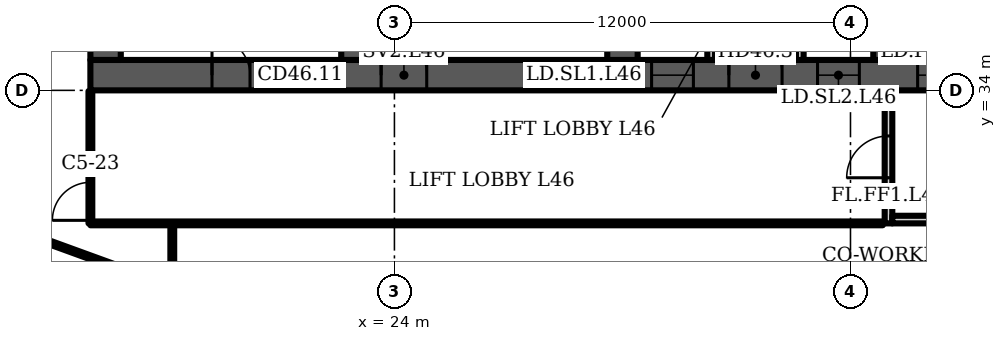
"""IFC4 building model, lengths in metres.
Left out: names, types, materials, properties, quantities, classifications, styles, units other than length and angle.
Written with IfcOpenShell. Run it as: python <this file> out.ifc"""

import sys

from ifc_helpers import new_model, si_unit, direction, frame, frame_2d, origin, place, context, subcontext, project, spatial, polyline, rectangle, outline, extrude, element, fill, save


model = new_model("IFC4")
c1 = context("Model", 3, precision=1e-05, world=origin(), true_north=direction((0.0, 1.0)))
c2 = subcontext(c1, "Body", "Model", "MODEL_VIEW")
j1 = project(units=[si_unit("LENGTHUNIT", "METRE"), si_unit("PLANEANGLEUNIT", "RADIAN")], contexts=[c1])
p1 = place(None, origin())
s1 = spatial("IfcSite", under=j1, at=p1, CompositionType="ELEMENT")
p2 = place(p1, origin())
s2 = spatial("IfcBuilding", under=s1, at=p2, CompositionType="ELEMENT")
p3 = place(p2, frame((0.0, 0.0, 187.9)))
s3 = spatial("IfcBuildingStorey", under=s2, at=p3, CompositionType="ELEMENT", Elevation=187.9)
p4 = place(p3, frame((16.0, 34.4, 0.0), z_axis=(0.0, 0.0, 1.0), x_axis=(1.0, 0.0, 0.0)))
e1 = element("IfcWall", 1, at=p4, inside=s3, PredefinedType="SHEAR", context=c2, shape_type="SweptSolid", body=[
    extrude(rectangle(XDim=42.0, YDim=0.8, at=frame_2d((21.0, 0.0))), origin(), (0.0, 0.0, 1.0), 3.6),
])
p5 = place(p4, frame((3.2, 0.0, 0.0)))
e2 = element("IfcOpeningElement", 2, at=p5, cuts=e1, PredefinedType="OPENING", context=c2, shape_type="SweptSolid", body=[
    extrude(rectangle(XDim=1.0, YDim=2.1, at=frame_2d((0.5, 1.05))), frame((0.0, 0.41, 0.0), z_axis=(0.0, -1.0, 0.0), x_axis=(1.0, 0.0, 0.0)), (0.0, 0.0, 1.0), 0.82),
])
p6 = place(p4, frame((7.65, 0.0, 0.0)))
e3 = element("IfcOpeningElement", 3, at=p6, cuts=e1, PredefinedType="OPENING", context=c2, shape_type="SweptSolid", body=[
    extrude(rectangle(XDim=1.2, YDim=2.1, at=frame_2d((0.6, 1.05))), frame((0.0, 0.41, 0.0), z_axis=(0.0, -1.0, 0.0), x_axis=(1.0, 0.0, 0.0)), (0.0, 0.0, 1.0), 0.82),
])
p7 = place(p4, frame((14.767, 0.0, 0.0)))
e4 = element("IfcOpeningElement", 4, at=p7, cuts=e1, PredefinedType="OPENING", context=c2, shape_type="SweptSolid", body=[
    extrude(rectangle(XDim=1.1, YDim=2.1, at=frame_2d((0.55, 1.05))), frame((0.0, 0.41, 0.0), z_axis=(0.0, -1.0, 0.0), x_axis=(1.0, 0.0, 0.0)), (0.0, 0.0, 1.0), 0.82),
])
p8 = place(p4, frame((19.133, 0.0, 0.0)))
e5 = element("IfcOpeningElement", 5, at=p8, cuts=e1, PredefinedType="OPENING", context=c2, shape_type="SweptSolid", body=[
    extrude(rectangle(XDim=1.1, YDim=2.1, at=frame_2d((0.55, 1.05))), frame((0.0, 0.41, 0.0), z_axis=(0.0, -1.0, 0.0), x_axis=(1.0, 0.0, 0.0)), (0.0, 0.0, 1.0), 0.82),
])
p9 = place(p4, frame((16.8, 0.0, 0.0)))
e6 = element("IfcOpeningElement", 6, at=p9, cuts=e1, PredefinedType="OPENING", context=c2, shape_type="SweptSolid", body=[
    extrude(rectangle(XDim=1.4, YDim=2.1, at=frame_2d((0.7, 1.05))), frame((0.0, 0.41, 0.0), z_axis=(0.0, -1.0, 0.0), x_axis=(1.0, 0.0, 0.0)), (0.0, 0.0, 1.0), 0.82),
])
p10 = place(p4, frame((21.767, 0.0, 0.0)))
e7 = element("IfcOpeningElement", 7, at=p10, cuts=e1, PredefinedType="OPENING", context=c2, shape_type="SweptSolid", body=[
    extrude(rectangle(XDim=1.1, YDim=2.1, at=frame_2d((0.55, 1.05))), frame((0.0, 0.41, 0.0), z_axis=(0.0, -1.0, 0.0), x_axis=(1.0, 0.0, 0.0)), (0.0, 0.0, 1.0), 0.82),
])
p11 = place(p4, frame((23.95, 0.0, 0.0)))
e8 = element("IfcOpeningElement", 8, at=p11, cuts=e1, PredefinedType="OPENING", context=c2, shape_type="SweptSolid", body=[
    extrude(rectangle(XDim=1.1, YDim=2.1, at=frame_2d((0.55, 1.05))), frame((0.0, 0.41, 0.0), z_axis=(0.0, -1.0, 0.0), x_axis=(1.0, 0.0, 0.0)), (0.0, 0.0, 1.0), 0.82),
])
p12 = place(p4, frame((26.133, 0.0, 0.0)))
e9 = element("IfcOpeningElement", 9, at=p12, cuts=e1, PredefinedType="OPENING", context=c2, shape_type="SweptSolid", body=[
    extrude(rectangle(XDim=1.1, YDim=2.1, at=frame_2d((0.55, 1.05))), frame((0.0, 0.41, 0.0), z_axis=(0.0, -1.0, 0.0), x_axis=(1.0, 0.0, 0.0)), (0.0, 0.0, 1.0), 0.82),
])
p13 = place(p4, frame((33.15, 0.0, 0.0)))
e10 = element("IfcOpeningElement", 10, at=p13, cuts=e1, PredefinedType="OPENING", context=c2, shape_type="SweptSolid", body=[
    extrude(rectangle(XDim=1.2, YDim=2.1, at=frame_2d((0.6, 1.05))), frame((0.0, 0.41, 0.0), z_axis=(0.0, -1.0, 0.0), x_axis=(1.0, 0.0, 0.0)), (0.0, 0.0, 1.0), 0.82),
])
p14 = place(p4, frame((35.817, 0.0, 0.0)))
e11 = element("IfcOpeningElement", 11, at=p14, cuts=e1, PredefinedType="OPENING", context=c2, shape_type="SweptSolid", body=[
    extrude(rectangle(XDim=1.0, YDim=2.1, at=frame_2d((0.5, 1.05))), frame((0.0, 0.41, 0.0), z_axis=(0.0, -1.0, 0.0), x_axis=(1.0, 0.0, 0.0)), (0.0, 0.0, 1.0), 0.82),
])
p15 = place(p4, frame((39.95, 0.0, 0.0)))
e12 = element("IfcOpeningElement", 12, at=p15, cuts=e1, PredefinedType="OPENING", context=c2, shape_type="SweptSolid", body=[
    extrude(rectangle(XDim=1.0, YDim=2.1, at=frame_2d((0.5, 1.05))), frame((0.0, 0.41, 0.0), z_axis=(0.0, -1.0, 0.0), x_axis=(1.0, 0.0, 0.0)), (0.0, 0.0, 1.0), 0.82),
])
p16 = place(p4, frame((37.767, 0.0, 0.0)))
e13 = element("IfcOpeningElement", 13, at=p16, cuts=e1, PredefinedType="OPENING", context=c2, shape_type="SweptSolid", body=[
    extrude(rectangle(XDim=1.4, YDim=2.1, at=frame_2d((0.7, 1.05))), frame((0.0, 0.41, 0.0), z_axis=(0.0, -1.0, 0.0), x_axis=(1.0, 0.0, 0.0)), (0.0, 0.0, 1.0), 0.82),
])
p17 = place(p3, frame((16.4, 34.8, 0.0), z_axis=(0.0, 0.0, 1.0), x_axis=(0.0, 1.0, 0.0)))
e14 = element("IfcWall", 14, at=p17, inside=s3, PredefinedType="SHEAR", context=c2, shape_type="SweptSolid", body=[
    extrude(rectangle(XDim=13.184, YDim=0.8, at=frame_2d((6.592, 0.0))), origin(), (0.0, 0.0, 1.0), 3.6),
])
p18 = place(p3, frame((23.0, 34.8, 0.0), z_axis=(0.0, 0.0, 1.0), x_axis=(0.0, 1.0, 0.0)))
e15 = element("IfcWall", 15, at=p18, inside=s3, PredefinedType="SHEAR", context=c2, shape_type="SweptSolid", body=[
    extrude(rectangle(XDim=13.762, YDim=0.8, at=frame_2d((6.881, 0.0))), origin(), (0.0, 0.0, 1.0), 3.6),
])
p19 = place(p18, frame((2.55, 0.0, 0.0)))
e16 = element("IfcOpeningElement", 16, at=p19, cuts=e15, PredefinedType="OPENING", context=c2, shape_type="SweptSolid", body=[
    extrude(rectangle(XDim=1.1, YDim=2.1, at=frame_2d((0.55, 1.05))), frame((0.0, 0.41, 0.0), z_axis=(0.0, -1.0, 0.0), x_axis=(1.0, 0.0, 0.0)), (0.0, 0.0, 1.0), 0.82),
])
p20 = place(p18, frame((10.0, 0.0, 0.0)))
e17 = element("IfcOpeningElement", 17, at=p20, cuts=e15, PredefinedType="OPENING", context=c2, shape_type="SweptSolid", body=[
    extrude(rectangle(XDim=1.0, YDim=2.1, at=frame_2d((0.5, 1.05))), frame((0.0, 0.41, 0.0), z_axis=(0.0, -1.0, 0.0), x_axis=(1.0, 0.0, 0.0)), (0.0, 0.0, 1.0), 0.82),
])
p21 = place(p3, frame((30.0, 34.8, 0.0), z_axis=(0.0, 0.0, 1.0), x_axis=(0.0, 1.0, 0.0)))
e18 = element("IfcWall", 18, at=p21, inside=s3, PredefinedType="SHEAR", context=c2, shape_type="SweptSolid", body=[
    extrude(rectangle(XDim=14.374, YDim=0.8, at=frame_2d((7.187, 0.0))), origin(), (0.0, 0.0, 1.0), 3.6),
])
p22 = place(p21, frame((3.6, 0.0, 0.0)))
e19 = element("IfcOpeningElement", 19, at=p22, cuts=e18, PredefinedType="OPENING", context=c2, shape_type="SweptSolid", body=[
    extrude(rectangle(XDim=1.1, YDim=2.1, at=frame_2d((0.55, 1.05))), frame((0.0, 0.41, 0.0), z_axis=(0.0, -1.0, 0.0), x_axis=(1.0, 0.0, 0.0)), (0.0, 0.0, 1.0), 0.82),
])
p23 = place(p3, frame((37.0, 34.8, 0.0), z_axis=(0.0, 0.0, 1.0), x_axis=(0.0, 1.0, 0.0)))
e20 = element("IfcWall", 20, at=p23, inside=s3, PredefinedType="SHEAR", context=c2, shape_type="SweptSolid", body=[
    extrude(rectangle(XDim=14.987, YDim=0.8, at=frame_2d((7.493, 0.0))), origin(), (0.0, 0.0, 1.0), 3.6),
])
p24 = place(p23, frame((11.312, 0.0, 0.0)))
e21 = element("IfcOpeningElement", 21, at=p24, cuts=e20, PredefinedType="OPENING", context=c2, shape_type="SweptSolid", body=[
    extrude(rectangle(XDim=1.0, YDim=2.1, at=frame_2d((0.5, 1.05))), frame((0.0, 0.41, 0.0), z_axis=(0.0, -1.0, 0.0), x_axis=(1.0, 0.0, 0.0)), (0.0, 0.0, 1.0), 0.82),
])
p25 = place(p23, frame((3.6, 0.0, 0.0)))
e22 = element("IfcOpeningElement", 22, at=p25, cuts=e20, PredefinedType="OPENING", context=c2, shape_type="SweptSolid", body=[
    extrude(rectangle(XDim=1.1, YDim=2.1, at=frame_2d((0.55, 1.05))), frame((0.0, 0.41, 0.0), z_axis=(0.0, -1.0, 0.0), x_axis=(1.0, 0.0, 0.0)), (0.0, 0.0, 1.0), 0.82),
])
p26 = place(p3, origin())
e23 = element("IfcWall", 23, at=p26, inside=s3, PredefinedType="PARTITIONING", context=c2, shape_type="SweptSolid", body=[
    extrude(outline(polyline([(32.233, 37.65), (30.4, 37.65), (30.4, 37.85), (32.233, 37.85), (32.433, 37.85), (32.433, 34.8), (32.233, 34.8), (32.233, 37.65)])), origin(), (0.0, 0.0, 1.0), 3.2),
])
p27 = place(p3, origin())
e24 = element("IfcWall", 24, at=p27, inside=s3, PredefinedType="PARTITIONING", context=c2, shape_type="SweptSolid", body=[
    extrude(outline(polyline([(34.567, 37.85), (34.767, 37.85), (36.6, 37.85), (36.6, 37.65), (34.767, 37.65), (34.767, 34.8), (34.567, 34.8), (34.567, 37.85)])), origin(), (0.0, 0.0, 1.0), 3.2),
])
p28 = place(p3, origin())
e25 = element("IfcWall", 25, at=p28, inside=s3, PredefinedType="PARTITIONING", context=c2, shape_type="SweptSolid", body=[
    extrude(outline(polyline([(41.567, 37.1), (39.433, 37.1), (39.433, 34.8), (39.233, 34.8), (39.233, 37.65), (37.4, 37.65), (37.4, 37.85), (39.233, 37.85), (39.433, 37.85), (39.433, 37.3), (41.567, 37.3), (41.567, 37.55), (41.767, 37.55), (43.6, 37.55), (43.6, 37.35), (41.767, 37.35), (41.767, 34.8), (41.567, 34.8), (41.567, 37.1)])), origin(), (0.0, 0.0, 1.0), 3.2),
])
p29 = place(p3, frame((37.0, 30.5, 0.0), z_axis=(0.0, 0.0, 1.0), x_axis=(0.0, 1.0, 0.0)))
e26 = element("IfcWall", 26, at=p29, inside=s3, PredefinedType="PARTITIONING", context=c2, shape_type="SweptSolid", body=[
    extrude(rectangle(XDim=3.5, YDim=0.2, at=frame_2d((1.75, 0.0))), origin(), (0.0, 0.0, 1.0), 3.2),
])
p30 = place(p29, frame((1.2, 0.0, 0.0)))
e27 = element("IfcOpeningElement", 27, at=p30, cuts=e26, PredefinedType="OPENING", context=c2, shape_type="SweptSolid", body=[
    extrude(rectangle(XDim=1.1, YDim=2.1, at=frame_2d((0.55, 1.05))), frame((0.0, 0.11, 0.0), z_axis=(0.0, -1.0, 0.0), x_axis=(1.0, 0.0, 0.0)), (0.0, 0.0, 1.0), 0.22),
])
p31 = place(p3, frame((37.1, 30.6, 0.0), z_axis=(0.0, 0.0, 1.0), x_axis=(1.0, 0.0, 0.0)))
e28 = element("IfcWall", 28, at=p31, inside=s3, PredefinedType="PARTITIONING", context=c2, shape_type="SweptSolid", body=[
    extrude(rectangle(XDim=2.8, YDim=0.2, at=frame_2d((1.4, 0.0))), origin(), (0.0, 0.0, 1.0), 3.2),
])
p32 = place(p3, frame((16.0, 30.5, 0.0), z_axis=(0.0, 0.0, 1.0), x_axis=(0.0, 1.0, 0.0)))
e29 = element("IfcWall", 29, at=p32, inside=s3, PredefinedType="PARTITIONING", context=c2, shape_type="SweptSolid", body=[
    extrude(rectangle(XDim=3.48, YDim=0.1, at=frame_2d((1.74, 0.0))), origin(), (0.0, 0.0, 1.0), 3.2),
])
p33 = place(p32, frame((0.08, 0.0, 0.0)))
e30 = element("IfcOpeningElement", 30, at=p33, cuts=e29, PredefinedType="OPENING", context=c2, shape_type="SweptSolid", body=[
    extrude(rectangle(XDim=1.0, YDim=2.1, at=frame_2d((0.5, 1.05))), frame((0.0, 0.06, 0.0), z_axis=(0.0, -1.0, 0.0), x_axis=(1.0, 0.0, 0.0)), (0.0, 0.0, 1.0), 0.12),
])
p34 = place(p3, frame((16.0, 30.5, 0.0), z_axis=(0.0, 0.0, 1.0), x_axis=(1.0, 0.0, 0.0)))
e31 = element("IfcWall", 31, at=p34, inside=s3, PredefinedType="PARTITIONING", context=c2, shape_type="SweptSolid", body=[
    extrude(rectangle(XDim=20.85, YDim=0.1, at=frame_2d((10.425, 0.0))), origin(), (0.0, 0.0, 1.0), 3.2),
])
p35 = place(p3, frame((17.185, 29.175, 0.0), z_axis=(0.0, 0.0, 1.0), x_axis=(-0.939764, 0.341818, 0.0)))
e32 = element("IfcWall", 32, at=p35, inside=s3, PredefinedType="PARTITIONING", context=c2, shape_type="SweptSolid", body=[
    extrude(rectangle(XDim=2.852, YDim=0.1, at=frame_2d((1.426, 0.0))), origin(), (0.0, 0.0, 1.0), 3.2),
])
p36 = place(p3, frame((18.155, 29.18, 0.0), z_axis=(0.0, 0.0, 1.0), x_axis=(0.0, 1.0, 0.0)))
e33 = element("IfcWall", 33, at=p36, inside=s3, PredefinedType="PARTITIONING", context=c2, shape_type="SweptSolid", body=[
    extrude(rectangle(XDim=1.32, YDim=0.1, at=frame_2d((0.66, 0.0))), origin(), (0.0, 0.0, 1.0), 3.2),
])
p37 = place(p5, origin())
e34 = element("IfcDoor", 34, at=p37, inside=s3, OperationType="SINGLE_SWING_LEFT", PredefinedType="DOOR", context=c2, shape_type="SweptSolid", body=[
    extrude(rectangle(XDim=1.0, YDim=2.1, at=frame_2d((0.5, 1.05))), frame((0.0, 0.4, 0.0), z_axis=(0.0, -1.0, 0.0), x_axis=(1.0, 0.0, 0.0)), (0.0, 0.0, 1.0), 0.8),
])
fill(e2, e34)
p38 = place(p6, origin())
e35 = element("IfcDoor", 35, at=p38, inside=s3, OperationType="SINGLE_SWING_LEFT", PredefinedType="DOOR", context=c2, shape_type="SweptSolid", body=[
    extrude(rectangle(XDim=1.2, YDim=2.1, at=frame_2d((0.6, 1.05))), frame((0.0, 0.025, 0.0), z_axis=(0.0, -1.0, 0.0), x_axis=(1.0, 0.0, 0.0)), (0.0, 0.0, 1.0), 0.05),
])
fill(e3, e35)
p39 = place(p7, origin())
e36 = element("IfcDoor", 36, at=p39, inside=s3, OperationType="DOUBLE_DOOR_SLIDING", PredefinedType="DOOR", context=c2, shape_type="SweptSolid", body=[
    extrude(rectangle(XDim=1.1, YDim=2.1, at=frame_2d((0.55, 1.05))), frame((0.0, 0.025, 0.0), z_axis=(0.0, -1.0, 0.0), x_axis=(1.0, 0.0, 0.0)), (0.0, 0.0, 1.0), 0.05),
])
fill(e4, e36)
p40 = place(p8, origin())
e37 = element("IfcDoor", 37, at=p40, inside=s3, OperationType="DOUBLE_DOOR_SLIDING", PredefinedType="DOOR", context=c2, shape_type="SweptSolid", body=[
    extrude(rectangle(XDim=1.1, YDim=2.1, at=frame_2d((0.55, 1.05))), frame((0.0, 0.025, 0.0), z_axis=(0.0, -1.0, 0.0), x_axis=(1.0, 0.0, 0.0)), (0.0, 0.0, 1.0), 0.05),
])
fill(e5, e37)
p41 = place(p9, origin())
e38 = element("IfcDoor", 38, at=p41, inside=s3, OperationType="DOUBLE_DOOR_SINGLE_SWING", PredefinedType="DOOR", context=c2, shape_type="SweptSolid", body=[
    extrude(rectangle(XDim=1.4, YDim=2.1, at=frame_2d((0.7, 1.05))), frame((0.0, 0.025, 0.0), z_axis=(0.0, -1.0, 0.0), x_axis=(1.0, 0.0, 0.0)), (0.0, 0.0, 1.0), 0.05),
])
fill(e6, e38)
p42 = place(p10, origin())
e39 = element("IfcDoor", 39, at=p42, inside=s3, OperationType="DOUBLE_DOOR_SLIDING", PredefinedType="DOOR", context=c2, shape_type="SweptSolid", body=[
    extrude(rectangle(XDim=1.1, YDim=2.1, at=frame_2d((0.55, 1.05))), frame((0.0, 0.025, 0.0), z_axis=(0.0, -1.0, 0.0), x_axis=(1.0, 0.0, 0.0)), (0.0, 0.0, 1.0), 0.05),
])
fill(e7, e39)
p43 = place(p30, origin())
e40 = element("IfcDoor", 40, at=p43, inside=s3, OperationType="SINGLE_SWING_LEFT", PredefinedType="DOOR", context=c2, shape_type="SweptSolid", body=[
    extrude(rectangle(XDim=1.1, YDim=2.1, at=frame_2d((0.55, 1.05))), frame((0.0, 0.025, 0.0), z_axis=(0.0, -1.0, 0.0), x_axis=(1.0, 0.0, 0.0)), (0.0, 0.0, 1.0), 0.05),
])
fill(e27, e40)
p44 = place(p33, origin())
e41 = element("IfcDoor", 41, at=p44, inside=s3, OperationType="SINGLE_SWING_LEFT", PredefinedType="DOOR", context=c2, shape_type="SweptSolid", body=[
    extrude(rectangle(XDim=1.0, YDim=2.1, at=frame_2d((0.5, 1.05))), frame((0.0, 0.025, 0.0), z_axis=(0.0, -1.0, 0.0), x_axis=(1.0, 0.0, 0.0)), (0.0, 0.0, 1.0), 0.05),
])
fill(e30, e41)
save(model, sys.argv[1])
